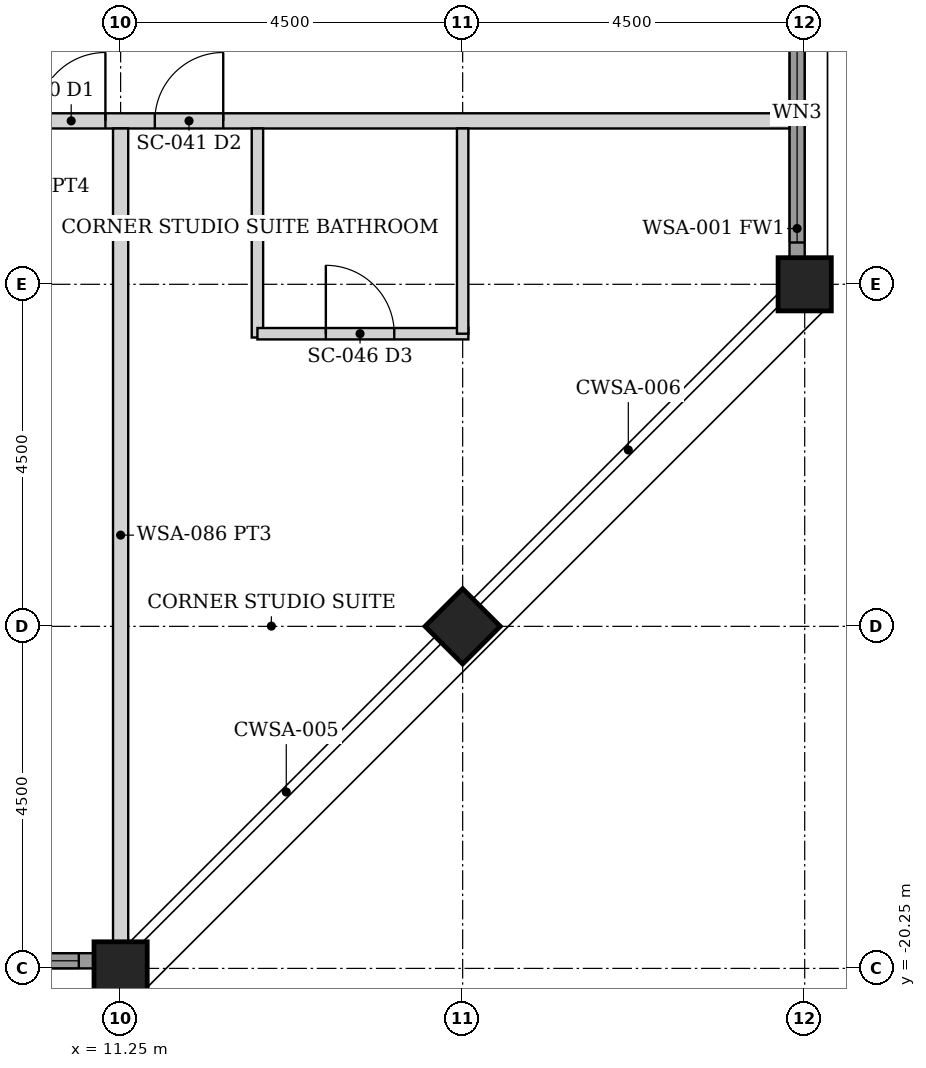
"""IFC4 building model, lengths in metres.
Left out: names, types, materials, properties, quantities, classifications, styles, units other than length and angle.
Written with IfcOpenShell. Run it as: python <this file> out.ifc"""

import sys

from ifc_helpers import new_model, si_unit, direction, frame, frame_2d, origin, origin_2d, place, context, subcontext, project, spatial, rectangle, hollow_rectangle, extrude, element, fill, save


model = new_model("IFC4")
c1 = context("Model", 3, precision=1e-05, world=origin(), true_north=direction((0.0, 1.0)))
c2 = subcontext(c1, "Body", "Model", "MODEL_VIEW")
j1 = project(units=[si_unit("LENGTHUNIT", "METRE"), si_unit("PLANEANGLEUNIT", "RADIAN")], contexts=[c1])
p1 = place(None, origin())
s1 = spatial("IfcSite", under=j1, at=p1, CompositionType="ELEMENT")
p2 = place(p1, origin())
s2 = spatial("IfcBuilding", under=s1, at=p2, CompositionType="ELEMENT")
p3 = place(p2, frame((0.0, 0.0, 223.3)))
s3 = spatial("IfcBuildingStorey", under=s2, at=p3, CompositionType="ELEMENT", Elevation=223.3)
for number, where, z_axis, x_axis in (
    (1, (20.25, -11.25, 0.0), (0.0, 0.0, 1.0), (1.0, 0.0, 0.0)),
    (2, (11.25, -20.25, 0.0), (0.0, 0.0, 1.0), (0.0, 1.0, 0.0)),
    (3, (15.75, -15.75, 0.0), (0.0, 0.0, 1.0), (0.707, -0.707, 0.0)),
):
    element("IfcColumn", number, at=place(p3, frame(where, z_axis=z_axis, x_axis=x_axis)), inside=s3, PredefinedType="COLUMN", context=c2, shape_type="SweptSolid", body=[
        extrude(hollow_rectangle(XDim=0.7, YDim=0.7, WallThickness=0.04, at=origin_2d()), origin(), (0.0, 0.0, 1.0), 3.75),
    ])
p4 = place(p3, frame((7.105, -20.15, 0.0), z_axis=(0.0, 0.0, 1.0), x_axis=(1.0, 0.0, 0.0)))
e4 = element("IfcWall", 4, at=p4, inside=s3, PredefinedType="SOLIDWALL", context=c2, shape_type="SweptSolid", body=[
    extrude(rectangle(XDim=3.79, YDim=0.2, at=frame_2d((1.895, 0.0))), origin(), (0.0, 0.0, 1.0), 2.629),
])
p5 = place(p4, frame((0.195, 0.0, 0.3)))
e5 = element("IfcOpeningElement", 5, at=p5, cuts=e4, PredefinedType="OPENING", context=c2, shape_type="SweptSolid", body=[
    extrude(rectangle(XDim=3.4, YDim=2.179, at=frame_2d((1.7, 1.089))), frame((0.0, 0.11, 0.0), z_axis=(0.0, -1.0, 0.0), x_axis=(1.0, 0.0, 0.0)), (0.0, 0.0, 1.0), 0.22),
])
p6 = place(p3, frame((20.15, -10.895, 0.0), z_axis=(0.0, 0.0, 1.0), x_axis=(0.0, 1.0, 0.0)))
e6 = element("IfcWall", 6, at=p6, inside=s3, PredefinedType="SOLIDWALL", context=c2, shape_type="SweptSolid", body=[
    extrude(rectangle(XDim=3.79, YDim=0.2, at=frame_2d((1.895, 0.0))), origin(), (0.0, 0.0, 1.0), 2.629),
])
p7 = place(p6, frame((0.195, 0.0, 0.3)))
e7 = element("IfcOpeningElement", 7, at=p7, cuts=e6, PredefinedType="OPENING", context=c2, shape_type="SweptSolid", body=[
    extrude(rectangle(XDim=3.4, YDim=2.179, at=frame_2d((1.7, 1.089))), frame((0.0, 0.11, 0.0), z_axis=(0.0, -1.0, 0.0), x_axis=(1.0, 0.0, 0.0)), (0.0, 0.0, 1.0), 0.22),
])
p8 = place(p3, frame((-20.05, -9.1, 0.0), z_axis=(0.0, 0.0, 1.0), x_axis=(1.0, 0.0, 0.0)))
e8 = element("IfcWall", 8, at=p8, inside=s3, PredefinedType="PARTITIONING", context=c2, shape_type="SweptSolid", body=[
    extrude(rectangle(XDim=40.1, YDim=0.2, at=frame_2d((20.05, 0.0))), origin(), (0.0, 0.0, 1.0), 2.629),
])
p9 = place(p8, frame((13.6, 0.0, 0.0)))
e9 = element("IfcOpeningElement", 9, at=p9, cuts=e8, PredefinedType="OPENING", context=c2, shape_type="SweptSolid", body=[
    extrude(rectangle(XDim=0.9, YDim=2.1, at=frame_2d((0.45, 1.05))), frame((0.0, 0.11, 0.0), z_axis=(0.0, -1.0, 0.0), x_axis=(1.0, 0.0, 0.0)), (0.0, 0.0, 1.0), 0.22),
])
p10 = place(p8, frame((21.2, 0.0, 0.0)))
e10 = element("IfcOpeningElement", 10, at=p10, cuts=e8, PredefinedType="OPENING", context=c2, shape_type="SweptSolid", body=[
    extrude(rectangle(XDim=0.9, YDim=2.1, at=frame_2d((0.45, 1.05))), frame((0.0, 0.11, 0.0), z_axis=(0.0, -1.0, 0.0), x_axis=(1.0, 0.0, 0.0)), (0.0, 0.0, 1.0), 0.22),
])
p11 = place(p8, frame((22.5, 0.0, 0.0)))
e11 = element("IfcOpeningElement", 11, at=p11, cuts=e8, PredefinedType="OPENING", context=c2, shape_type="SweptSolid", body=[
    extrude(rectangle(XDim=0.9, YDim=2.1, at=frame_2d((0.45, 1.05))), frame((0.0, 0.11, 0.0), z_axis=(0.0, -1.0, 0.0), x_axis=(1.0, 0.0, 0.0)), (0.0, 0.0, 1.0), 0.22),
])
p12 = place(p8, frame((30.2, 0.0, 0.0)))
e12 = element("IfcOpeningElement", 12, at=p12, cuts=e8, PredefinedType="OPENING", context=c2, shape_type="SweptSolid", body=[
    extrude(rectangle(XDim=0.9, YDim=2.1, at=frame_2d((0.45, 1.05))), frame((0.0, 0.11, 0.0), z_axis=(0.0, -1.0, 0.0), x_axis=(1.0, 0.0, 0.0)), (0.0, 0.0, 1.0), 0.22),
])
p13 = place(p8, frame((31.75, 0.0, 0.0)))
e13 = element("IfcOpeningElement", 13, at=p13, cuts=e8, PredefinedType="OPENING", context=c2, shape_type="SweptSolid", body=[
    extrude(rectangle(XDim=0.9, YDim=2.1, at=frame_2d((0.45, 1.05))), frame((0.0, 0.11, 0.0), z_axis=(0.0, -1.0, 0.0), x_axis=(1.0, 0.0, 0.0)), (0.0, 0.0, 1.0), 0.22),
])
p14 = place(p8, frame((7.45, 0.0, 0.0)))
e14 = element("IfcOpeningElement", 14, at=p14, cuts=e8, PredefinedType="OPENING", context=c2, shape_type="SweptSolid", body=[
    extrude(rectangle(XDim=0.9, YDim=2.1, at=frame_2d((0.45, 1.05))), frame((0.0, 0.11, 0.0), z_axis=(0.0, -1.0, 0.0), x_axis=(1.0, 0.0, 0.0)), (0.0, 0.0, 1.0), 0.22),
])
p15 = place(p3, frame((11.25, -19.9, 0.0), z_axis=(0.0, 0.0, 1.0), x_axis=(0.0, 1.0, 0.0)))
e15 = element("IfcWall", 15, at=p15, inside=s3, PredefinedType="PARTITIONING", context=c2, shape_type="SweptSolid", body=[
    extrude(rectangle(XDim=10.7, YDim=0.2, at=frame_2d((5.35, 0.0))), origin(), (0.0, 0.0, 1.0), 2.629),
])
p16 = place(p3, frame((13.05, -11.95, 0.0), z_axis=(0.0, 0.0, 1.0), x_axis=(0.0, 1.0, 0.0)))
e16 = element("IfcWall", 16, at=p16, inside=s3, PredefinedType="PARTITIONING", context=c2, shape_type="SweptSolid", body=[
    extrude(rectangle(XDim=2.75, YDim=0.15, at=frame_2d((1.375, 0.0))), origin(), (0.0, 0.0, 1.0), 2.629),
])
p17 = place(p3, frame((13.05, -11.9, 0.0), z_axis=(0.0, 0.0, 1.0), x_axis=(1.0, 0.0, 0.0)))
e17 = element("IfcWall", 17, at=p17, inside=s3, PredefinedType="PARTITIONING", context=c2, shape_type="SweptSolid", body=[
    extrude(rectangle(XDim=2.775, YDim=0.15, at=frame_2d((1.387, 0.0))), origin(), (0.0, 0.0, 1.0), 2.629),
])
p18 = place(p17, frame((0.9, 0.0, 0.0)))
e18 = element("IfcOpeningElement", 18, at=p18, cuts=e17, PredefinedType="OPENING", context=c2, shape_type="SweptSolid", body=[
    extrude(rectangle(XDim=0.9, YDim=2.1, at=frame_2d((0.45, 1.05))), frame((0.0, 0.085, 0.0), z_axis=(0.0, -1.0, 0.0), x_axis=(1.0, 0.0, 0.0)), (0.0, 0.0, 1.0), 0.17),
])
p19 = place(p3, frame((15.75, -11.9, 0.0), z_axis=(0.0, 0.0, 1.0), x_axis=(0.0, 1.0, 0.0)))
e19 = element("IfcWall", 19, at=p19, inside=s3, PredefinedType="PARTITIONING", context=c2, shape_type="SweptSolid", body=[
    extrude(rectangle(XDim=2.7, YDim=0.15, at=frame_2d((1.35, 0.0))), origin(), (0.0, 0.0, 1.0), 2.629),
])
p20 = place(p5, origin())
e20 = element("IfcWindow", 20, at=p20, inside=s3, PartitioningType="SINGLE_PANEL", PredefinedType="WINDOW", context=c2, shape_type="SweptSolid", body=[
    extrude(rectangle(XDim=3.4, YDim=2.179, at=frame_2d((1.7, 1.089))), frame((0.0, 0.03, 0.0), z_axis=(0.0, -1.0, 0.0), x_axis=(1.0, 0.0, 0.0)), (0.0, 0.0, 1.0), 0.06),
])
fill(e5, e20)
p21 = place(p7, origin())
e21 = element("IfcWindow", 21, at=p21, inside=s3, PartitioningType="SINGLE_PANEL", PredefinedType="WINDOW", context=c2, shape_type="SweptSolid", body=[
    extrude(rectangle(XDim=3.4, YDim=2.179, at=frame_2d((1.7, 1.089))), frame((0.0, 0.03, 0.0), z_axis=(0.0, -1.0, 0.0), x_axis=(1.0, 0.0, 0.0)), (0.0, 0.0, 1.0), 0.06),
])
fill(e7, e21)
p22 = place(p12, origin())
e22 = element("IfcDoor", 22, at=p22, inside=s3, OperationType="SINGLE_SWING_RIGHT", PredefinedType="DOOR", context=c2, shape_type="SweptSolid", body=[
    extrude(rectangle(XDim=0.9, YDim=2.1, at=frame_2d((0.45, 1.05))), frame((0.0, 0.025, 0.0), z_axis=(0.0, -1.0, 0.0), x_axis=(1.0, 0.0, 0.0)), (0.0, 0.0, 1.0), 0.05),
])
fill(e12, e22)
p23 = place(p13, origin())
e23 = element("IfcDoor", 23, at=p23, inside=s3, OperationType="SINGLE_SWING_RIGHT", PredefinedType="DOOR", context=c2, shape_type="SweptSolid", body=[
    extrude(rectangle(XDim=0.9, YDim=2.1, at=frame_2d((0.45, 1.05))), frame((0.0, 0.025, 0.0), z_axis=(0.0, -1.0, 0.0), x_axis=(1.0, 0.0, 0.0)), (0.0, 0.0, 1.0), 0.05),
])
fill(e13, e23)
p24 = place(p18, origin())
e24 = element("IfcDoor", 24, at=p24, inside=s3, OperationType="SINGLE_SWING_LEFT", PredefinedType="DOOR", context=c2, shape_type="SweptSolid", body=[
    extrude(rectangle(XDim=0.9, YDim=2.1, at=frame_2d((0.45, 1.05))), frame((0.0, 0.025, 0.0), z_axis=(0.0, -1.0, 0.0), x_axis=(1.0, 0.0, 0.0)), (0.0, 0.0, 1.0), 0.05),
])
fill(e18, e24)
save(model, sys.argv[1])
